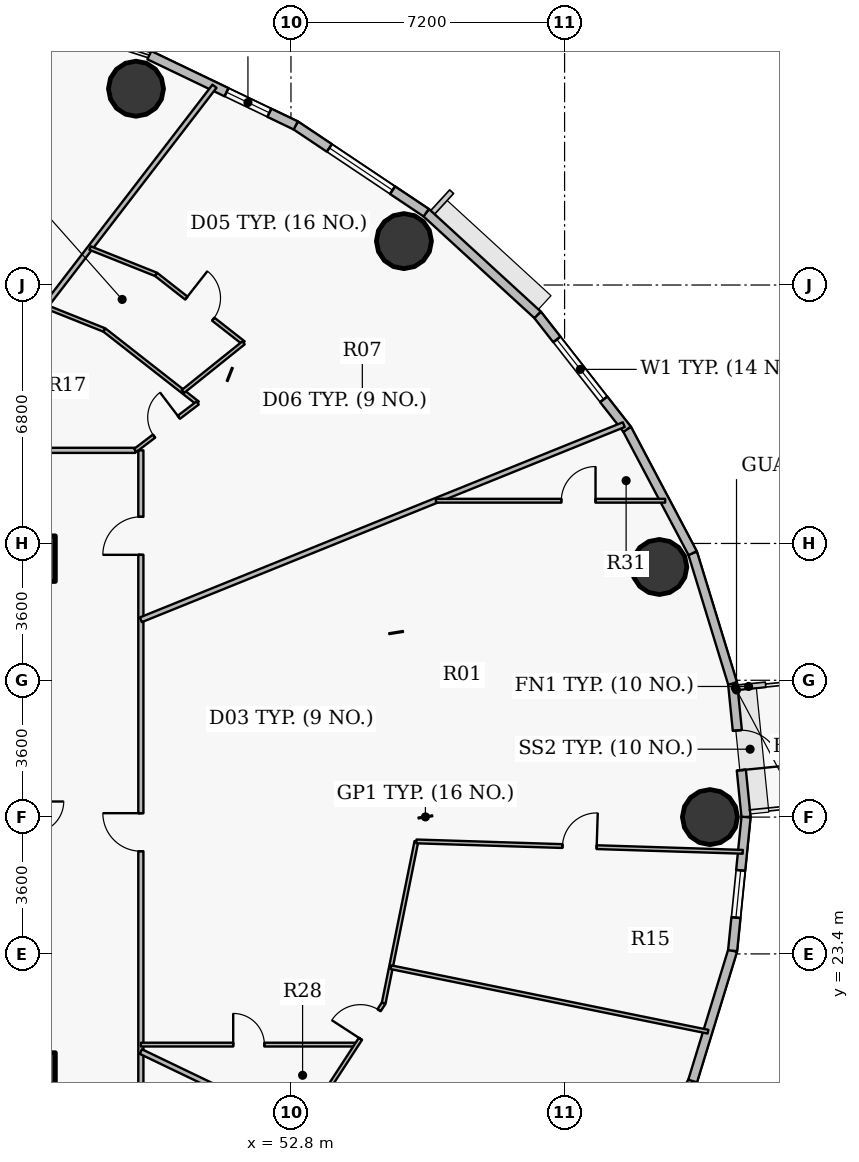
"""IFC4 building model, lengths in metres.
Left out: names, types, materials, properties, quantities, classifications, styles, units other than length and angle.
Written with IfcOpenShell. Run it as: python <this file> out.ifc"""

import sys

from ifc_helpers import new_model, si_unit, direction, frame, frame_2d, origin, origin_2d, place, context, subcontext, project, spatial, rectangle, hollow_circle, extrude, source, transform, mapped, element, fill, save


model = new_model("IFC4")
c1 = context("Model", 3, precision=1e-05, world=origin(), true_north=direction((0.0, 1.0)))
c2 = subcontext(c1, "Body", "Model", "MODEL_VIEW")
j1 = project(units=[si_unit("LENGTHUNIT", "METRE"), si_unit("PLANEANGLEUNIT", "RADIAN")], contexts=[c1])
p1 = place(None, origin())
s1 = spatial("IfcSite", under=j1, at=p1, CompositionType="ELEMENT")
p2 = place(p1, origin())
s2 = spatial("IfcBuilding", under=s1, at=p2, CompositionType="ELEMENT")
p3 = place(p2, frame((0.0, 0.0, 97.2)))
s3 = spatial("IfcBuildingStorey", under=s2, at=p3, CompositionType="ELEMENT", Elevation=97.2)
for number, where, z_axis, x_axis in (
    (1, (46.0, 20.2, 0.0), (0.0, 0.0, 1.0), (1.0, 0.0, 0.0)),
    (2, (46.0, 33.8, 0.0), (0.0, 0.0, 1.0), (1.0, 0.0, 0.0)),
):
    element("IfcColumn", number, at=place(p3, frame(where, z_axis=z_axis, x_axis=x_axis)), inside=s3, PredefinedType="COLUMN", context=c2, shape_type="SweptSolid", body=[
        extrude(rectangle(XDim=1.2, YDim=1.2, at=origin_2d()), origin(), (0.0, 0.0, 1.0), 3.75),
    ])
for number, where, z_axis, x_axis in (
    (3, (63.825, 27.0, 0.0), (0.0, 0.0, 1.0), (1.0, 0.0, 0.0)),
    (4, (62.493, 33.581, 0.0), (0.0, 0.0, 1.0), (1.0, 0.0, 0.0)),
    (5, (55.773, 42.156, 0.0), (0.0, 0.0, 1.0), (1.0, 0.0, 0.0)),
    (6, (48.722, 46.165, 0.0), (0.0, 0.0, 1.0), (1.0, 0.0, 0.0)),
):
    element("IfcColumn", number, at=place(p3, frame(where, z_axis=z_axis, x_axis=x_axis)), inside=s3, PredefinedType="COLUMN", context=c2, shape_type="SweptSolid", body=[
        extrude(hollow_circle(Radius=0.725, WallThickness=0.042, at=origin_2d()), origin(), (0.0, 0.0, 1.0), 3.75),
    ])
p4 = place(p3, frame((64.422, 30.515, 0.0), z_axis=(0.0, 0.0, 1.0), x_axis=(0.099989468229, -0.994988495533, 0.0)))
e7 = element("IfcWall", 7, at=p4, inside=s3, PredefinedType="SOLIDWALL", context=c2, shape_type="SweptSolid", body=[
    extrude(rectangle(XDim=3.533, YDim=0.24, at=frame_2d((1.767, 0.0))), origin(), (0.0, 0.0, 1.0), 3.5),
])
p5 = place(p4, frame((1.241, 0.0, 0.0)))
e8 = element("IfcOpeningElement", 8, at=p5, cuts=e7, PredefinedType="OPENING", context=c2, shape_type="SweptSolid", body=[
    extrude(rectangle(XDim=1.05, YDim=2.15, at=origin_2d()), frame((0.525, 0.13, 1.075), z_axis=(0.0, -1.0, 0.0), x_axis=(1.0, 0.0, 0.0)), (0.0, 0.0, 1.0), 0.26),
])
p6 = place(p3, frame((63.37, 33.945, 0.0), z_axis=(0.0, 0.0, 1.0), x_axis=(0.293124431344, -0.956074300329, 0.0)))
e9 = element("IfcWall", 9, at=p6, inside=s3, PredefinedType="SOLIDWALL", context=c2, shape_type="SweptSolid", body=[
    extrude(rectangle(XDim=3.587, YDim=0.24, at=frame_2d((1.793, 0.0))), origin(), (0.0, 0.0, 1.0), 3.5),
])
p7 = place(p3, frame((61.645, 37.206, 0.0), z_axis=(0.0, 0.0, 1.0), x_axis=(0.467614004126, -0.883932770716, 0.0)))
e10 = element("IfcWall", 10, at=p7, inside=s3, PredefinedType="SOLIDWALL", context=c2, shape_type="SweptSolid", body=[
    extrude(rectangle(XDim=3.689, YDim=0.24, at=frame_2d((1.844, 0.0))), origin(), (0.0, 0.0, 1.0), 3.5),
])
p8 = place(p3, frame((59.289, 40.217, 0.0), z_axis=(0.0, 0.0, 1.0), x_axis=(0.616272103517, -0.787533297345, 0.0)))
e11 = element("IfcWall", 11, at=p8, inside=s3, PredefinedType="SOLIDWALL", context=c2, shape_type="SweptSolid", body=[
    extrude(rectangle(XDim=3.823, YDim=0.24, at=frame_2d((1.912, 0.0))), origin(), (0.0, 0.0, 1.0), 3.5),
])
p9 = place(p8, frame((0.824, 0.0, 0.9)))
e12 = element("IfcOpeningElement", 12, at=p9, cuts=e11, PredefinedType="OPENING", context=c2, shape_type="SweptSolid", body=[
    extrude(rectangle(XDim=2.0, YDim=1.75, at=origin_2d()), frame((1.0, 0.13, 0.875), z_axis=(0.0, -1.0, 0.0), x_axis=(1.0, 0.0, 0.0)), (0.0, 0.0, 1.0), 0.26),
])
p10 = place(p3, frame((56.358, 42.903, 0.0), z_axis=(0.0, 0.0, 1.0), x_axis=(0.737113356241, -0.675769117414, 0.0)))
e13 = element("IfcWall", 13, at=p10, inside=s3, PredefinedType="SOLIDWALL", context=c2, shape_type="SweptSolid", body=[
    extrude(rectangle(XDim=3.976, YDim=0.24, at=frame_2d((1.988, 0.0))), origin(), (0.0, 0.0, 1.0), 3.5),
])
p11 = place(p3, frame((52.925, 45.199, 0.0), z_axis=(0.0, 0.0, 1.0), x_axis=(0.831221811447, -0.555940914284, 0.0)))
e14 = element("IfcWall", 14, at=p11, inside=s3, PredefinedType="SOLIDWALL", context=c2, shape_type="SweptSolid", body=[
    extrude(rectangle(XDim=4.13, YDim=0.24, at=frame_2d((2.065, 0.0))), origin(), (0.0, 0.0, 1.0), 3.5),
])
p12 = place(p11, frame((1.065, 0.0, 0.9)))
e15 = element("IfcOpeningElement", 15, at=p12, cuts=e14, PredefinedType="OPENING", context=c2, shape_type="SweptSolid", body=[
    extrude(rectangle(XDim=2.0, YDim=1.75, at=origin_2d()), frame((1.0, 0.13, 0.875), z_axis=(0.0, -1.0, 0.0), x_axis=(1.0, 0.0, 0.0)), (0.0, 0.0, 1.0), 0.26),
])
p13 = place(p3, frame((49.074, 47.047, 0.0), z_axis=(0.0, 0.0, 1.0), x_axis=(0.901589935876, -0.432591709962, 0.0)))
e16 = element("IfcWall", 16, at=p13, inside=s3, PredefinedType="SOLIDWALL", context=c2, shape_type="SweptSolid", body=[
    extrude(rectangle(XDim=4.272, YDim=0.24, at=frame_2d((2.136, 0.0))), origin(), (0.0, 0.0, 1.0), 3.5),
])
p14 = place(p13, frame((2.252, 0.0, 0.9)))
e17 = element("IfcOpeningElement", 17, at=p14, cuts=e16, PredefinedType="OPENING", context=c2, shape_type="SweptSolid", body=[
    extrude(rectangle(XDim=1.25, YDim=1.65, at=origin_2d()), frame((0.625, 0.13, 0.825), z_axis=(0.0, -1.0, 0.0), x_axis=(1.0, 0.0, 0.0)), (0.0, 0.0, 1.0), 0.26),
])
p15 = place(p3, frame((63.37, 20.055, 0.0), z_axis=(0.0, 0.0, 1.0), x_axis=(-0.467614004126, -0.883932770716, 0.0)))
e18 = element("IfcWall", 18, at=p15, inside=s3, PredefinedType="SOLIDWALL", context=c2, shape_type="SweptSolid", body=[
    extrude(rectangle(XDim=3.689, YDim=0.24, at=frame_2d((1.844, 0.0))), origin(), (0.0, 0.0, 1.0), 3.5),
])
p16 = place(p15, frame((1.219, 0.0, 0.9)))
e19 = element("IfcOpeningElement", 19, at=p16, cuts=e18, PredefinedType="OPENING", context=c2, shape_type="SweptSolid", body=[
    extrude(rectangle(XDim=1.25, YDim=1.65, at=origin_2d()), frame((0.625, 0.13, 0.825), z_axis=(0.0, -1.0, 0.0), x_axis=(1.0, 0.0, 0.0)), (0.0, 0.0, 1.0), 0.26),
])
p17 = place(p3, frame((64.422, 23.485, 0.0), z_axis=(0.0, 0.0, 1.0), x_axis=(-0.293124431344, -0.956074300329, 0.0)))
e20 = element("IfcWall", 20, at=p17, inside=s3, PredefinedType="SOLIDWALL", context=c2, shape_type="SweptSolid", body=[
    extrude(rectangle(XDim=3.587, YDim=0.24, at=frame_2d((1.793, 0.0))), origin(), (0.0, 0.0, 1.0), 3.5),
])
p18 = place(p3, frame((64.775, 27.0, 0.0), z_axis=(0.0, 0.0, 1.0), x_axis=(-0.099989468229, -0.994988495533, 0.0)))
e21 = element("IfcWall", 21, at=p18, inside=s3, PredefinedType="SOLIDWALL", context=c2, shape_type="SweptSolid", body=[
    extrude(rectangle(XDim=3.533, YDim=0.24, at=frame_2d((1.767, 0.0))), origin(), (0.0, 0.0, 1.0), 3.5),
])
p19 = place(p18, frame((1.408, 0.0, 0.9)))
e22 = element("IfcOpeningElement", 22, at=p19, cuts=e21, PredefinedType="OPENING", context=c2, shape_type="SweptSolid", body=[
    extrude(rectangle(XDim=1.25, YDim=1.65, at=origin_2d()), frame((0.625, 0.13, 0.825), z_axis=(0.0, -1.0, 0.0), x_axis=(1.0, 0.0, 0.0)), (0.0, 0.0, 1.0), 0.26),
])
p20 = place(p3, frame((37.205, 36.65, 0.0), z_axis=(0.0, 0.0, 1.0), x_axis=(1.0, 0.0, 0.0)))
e23 = element("IfcWall", 23, at=p20, inside=s3, PredefinedType="PARTITIONING", context=c2, shape_type="SweptSolid", body=[
    extrude(rectangle(XDim=11.499, YDim=0.135, at=frame_2d((5.75, 0.0))), origin(), (0.0, 0.0, 1.0), 2.935),
])
p21 = place(p20, frame((3.988, 0.0, 0.0)))
e24 = element("IfcOpeningElement", 24, at=p21, cuts=e23, PredefinedType="OPENING", context=c2, shape_type="SweptSolid", body=[
    extrude(rectangle(XDim=1.0, YDim=2.15, at=origin_2d()), frame((0.5, 0.078, 1.075), z_axis=(0.0, -1.0, 0.0), x_axis=(1.0, 0.0, 0.0)), (0.0, 0.0, 1.0), 0.155),
])
p22 = place(p3, frame((43.42, 36.65, 0.0), z_axis=(0.0, 0.0, 1.0), x_axis=(0.609572126114, 0.792730611913, 0.0)))
e25 = element("IfcWall", 25, at=p22, inside=s3, PredefinedType="PARTITIONING", context=c2, shape_type="SweptSolid", body=[
    extrude(rectangle(XDim=12.086, YDim=0.135, at=frame_2d((6.043, 0.0))), origin(), (0.0, 0.0, 1.0), 2.935),
])
p23 = place(p3, frame((46.333, 40.437, 0.0), z_axis=(0.0, 0.0, 1.0), x_axis=(0.928817558248, -0.370537371247, 0.0)))
e26 = element("IfcWall", 26, at=p23, inside=s3, PredefinedType="PARTITIONING", context=c2, shape_type="SweptSolid", body=[
    extrude(rectangle(XDim=1.677, YDim=0.1, at=frame_2d((0.839, 0.0))), origin(), (0.0, 0.0, 1.0), 3.185),
])
p24 = place(p3, frame((47.514, 41.973, 0.0), z_axis=(0.0, 0.0, 1.0), x_axis=(0.928809612726, -0.370557287485, 0.0)))
e27 = element("IfcWall", 27, at=p24, inside=s3, PredefinedType="PARTITIONING", context=c2, shape_type="SweptSolid", body=[
    extrude(rectangle(XDim=1.869, YDim=0.1, at=frame_2d((0.935, 0.0))), origin(), (0.0, 0.0, 1.0), 3.5),
])
p25 = place(p3, frame((47.891, 39.816, 0.0), z_axis=(0.0, 0.0, 1.0), x_axis=(0.787339621997, -0.616519520887, 0.0)))
e28 = element("IfcWall", 28, at=p25, inside=s3, PredefinedType="PARTITIONING", context=c2, shape_type="SweptSolid", body=[
    extrude(rectangle(XDim=3.116, YDim=0.1, at=frame_2d((1.558, 0.0))), origin(), (0.0, 0.0, 1.0), 2.935),
])
p26 = place(p3, frame((48.704, 36.65, 0.0), z_axis=(0.0, 0.0, 1.0), x_axis=(0.796299280247, 0.604902848628, 0.0)))
e29 = element("IfcWall", 29, at=p26, inside=s3, PredefinedType="PARTITIONING", context=c2, shape_type="SweptSolid", body=[
    extrude(rectangle(XDim=2.059, YDim=0.1, at=frame_2d((1.029, 0.0))), origin(), (0.0, 0.0, 1.0), 2.935),
])
p27 = place(p26, frame((0.619, 0.0, 0.0)))
e30 = element("IfcOpeningElement", 30, at=p27, cuts=e29, PredefinedType="OPENING", context=c2, shape_type="SweptSolid", body=[
    extrude(rectangle(XDim=0.82, YDim=2.1, at=origin_2d()), frame((0.41, 0.06, 1.05), z_axis=(0.0, -1.0, 0.0), x_axis=(1.0, 0.0, 0.0)), (0.0, 0.0, 1.0), 0.12),
])
p28 = place(p3, frame((48.85, 17.35, 0.0), z_axis=(0.0, 0.0, 1.0), x_axis=(0.0, 1.0, 0.0)))
e31 = element("IfcWall", 31, at=p28, inside=s3, PredefinedType="PARTITIONING", context=c2, shape_type="SweptSolid", body=[
    extrude(rectangle(XDim=19.3, YDim=0.135, at=frame_2d((9.65, 0.0))), origin(), (0.0, 0.0, 1.0), 2.935),
])
p29 = place(p28, frame((16.551, 0.0, 0.0)))
e32 = element("IfcOpeningElement", 32, at=p29, cuts=e31, PredefinedType="OPENING", context=c2, shape_type="SweptSolid", body=[
    extrude(rectangle(XDim=1.0, YDim=2.15, at=origin_2d()), frame((0.5, 0.078, 1.075), z_axis=(0.0, -1.0, 0.0), x_axis=(1.0, 0.0, 0.0)), (0.0, 0.0, 1.0), 0.155),
])
p30 = place(p28, frame((8.753, 0.0, 0.0)))
e33 = element("IfcOpeningElement", 33, at=p30, cuts=e31, PredefinedType="OPENING", context=c2, shape_type="SweptSolid", body=[
    extrude(rectangle(XDim=1.0, YDim=2.15, at=origin_2d()), frame((0.5, 0.078, 1.075), z_axis=(0.0, -1.0, 0.0), x_axis=(1.0, 0.0, 0.0)), (0.0, 0.0, 1.0), 0.155),
])
p31 = place(p3, frame((48.85, 20.83, 0.0), z_axis=(0.0, 0.0, 1.0), x_axis=(0.901472427533, -0.432836530803, 0.0)))
e34 = element("IfcWall", 34, at=p31, inside=s3, PredefinedType="PARTITIONING", context=c2, shape_type="SweptSolid", body=[
    extrude(rectangle(XDim=12.869, YDim=0.135, at=frame_2d((6.434, 0.0))), origin(), (0.0, 0.0, 1.0), 2.935),
])
p32 = place(p3, frame((48.85, 21.014, 0.0), z_axis=(0.0, 0.0, 1.0), x_axis=(1.0, 0.0, 0.0)))
e35 = element("IfcWall", 35, at=p32, inside=s3, PredefinedType="PARTITIONING", context=c2, shape_type="SweptSolid", body=[
    extrude(rectangle(XDim=5.68, YDim=0.1, at=frame_2d((2.84, 0.0))), origin(), (0.0, 0.0, 1.0), 2.935),
])
p33 = place(p32, frame((2.43, 0.0, 0.0)))
e36 = element("IfcOpeningElement", 36, at=p33, cuts=e35, PredefinedType="OPENING", context=c2, shape_type="SweptSolid", body=[
    extrude(rectangle(XDim=0.82, YDim=2.1, at=origin_2d()), frame((0.41, 0.06, 1.05), z_axis=(0.0, -1.0, 0.0), x_axis=(1.0, 0.0, 0.0)), (0.0, 0.0, 1.0), 0.12),
])
p34 = place(p3, frame((48.85, 32.192, 0.0), z_axis=(0.0, 0.0, 1.0), x_axis=(0.927181163505, 0.374613253958, 0.0)))
e37 = element("IfcWall", 37, at=p34, inside=s3, PredefinedType="PARTITIONING", context=c2, shape_type="SweptSolid", body=[
    extrude(rectangle(XDim=13.706, YDim=0.135, at=frame_2d((6.853, 0.0))), origin(), (0.0, 0.0, 1.0), 2.935),
])
p35 = place(p3, frame((49.25, 41.28, 0.0), z_axis=(0.0, 0.0, 1.0), x_axis=(0.787360471536, -0.616492893602, 0.0)))
e38 = element("IfcWall", 38, at=p35, inside=s3, PredefinedType="PARTITIONING", context=c2, shape_type="SweptSolid", body=[
    extrude(rectangle(XDim=2.923, YDim=0.1, at=frame_2d((1.462, 0.0))), origin(), (0.0, 0.0, 1.0), 3.5),
])
p36 = place(p35, frame((1.012, 0.0, 0.0)))
e39 = element("IfcOpeningElement", 39, at=p36, cuts=e38, PredefinedType="OPENING", context=c2, shape_type="SweptSolid", body=[
    extrude(rectangle(XDim=0.9, YDim=2.1, at=origin_2d()), frame((0.45, 0.06, 1.05), z_axis=(0.0, -1.0, 0.0), x_axis=(1.0, 0.0, 0.0)), (0.0, 0.0, 1.0), 0.12),
])
p37 = place(p3, frame((49.956, 38.198, 0.0), z_axis=(0.0, 0.0, 1.0), x_axis=(0.78000622602, 0.625771753413, 0.0)))
e40 = element("IfcWall", 40, at=p37, inside=s3, PredefinedType="PARTITIONING", context=c2, shape_type="SweptSolid", body=[
    extrude(rectangle(XDim=2.045, YDim=0.1, at=frame_2d((1.022, 0.0))), origin(), (0.0, 0.0, 1.0), 3.185),
])
p38 = place(p3, frame((53.087, 18.796, 0.0), z_axis=(0.0, 0.0, 1.0), x_axis=(0.545403476424, 0.838173638278, 0.0)))
e41 = element("IfcWall", 41, at=p38, inside=s3, PredefinedType="PARTITIONING", context=c2, shape_type="SweptSolid", body=[
    extrude(rectangle(XDim=3.948, YDim=0.1, at=frame_2d((1.974, 0.0))), origin(), (0.0, 0.0, 1.0), 2.935),
])
p39 = place(p38, frame((2.827, 0.0, 0.0)))
e42 = element("IfcOpeningElement", 42, at=p39, cuts=e41, PredefinedType="OPENING", context=c2, shape_type="SweptSolid", body=[
    extrude(rectangle(XDim=0.9, YDim=2.1, at=origin_2d()), frame((0.45, 0.06, 1.05), z_axis=(0.0, -1.0, 0.0), x_axis=(1.0, 0.0, 0.0)), (0.0, 0.0, 1.0), 0.12),
])
p40 = place(p3, frame((55.24, 22.105, 0.0), z_axis=(0.0, 0.0, 1.0), x_axis=(0.198113230311, 0.980179140757, 0.0)))
e43 = element("IfcWall", 43, at=p40, inside=s3, PredefinedType="PARTITIONING", context=c2, shape_type="SweptSolid", body=[
    extrude(rectangle(XDim=0.964, YDim=0.1, at=frame_2d((0.482, 0.0))), origin(), (0.0, 0.0, 1.0), 3.5),
])
p41 = place(p3, frame((55.433, 23.059, 0.0), z_axis=(0.0, 0.0, 1.0), x_axis=(0.198276597798, 0.980146106846, 0.0)))
e44 = element("IfcWall", 44, at=p41, inside=s3, PredefinedType="PARTITIONING", context=c2, shape_type="SweptSolid", body=[
    extrude(rectangle(XDim=3.368, YDim=0.1, at=frame_2d((1.684, 0.0))), origin(), (0.0, 0.0, 1.0), 3.5),
])
p42 = place(p3, frame((55.431, 23.05, 0.0), z_axis=(0.0, 0.0, 1.0), x_axis=(0.979953651871, -0.199225601228, 0.0)))
e45 = element("IfcWall", 45, at=p42, inside=s3, PredefinedType="PARTITIONING", context=c2, shape_type="SweptSolid", body=[
    extrude(rectangle(XDim=8.513, YDim=0.1, at=frame_2d((4.257, 0.0))), origin(), (0.0, 0.0, 1.0), 2.935),
])
p43 = place(p3, frame((56.101, 26.36, 0.0), z_axis=(0.0, 0.0, 1.0), x_axis=(0.999493466978, -0.031824667605, 0.0)))
e46 = element("IfcWall", 46, at=p43, inside=s3, PredefinedType="PARTITIONING", context=c2, shape_type="SweptSolid", body=[
    extrude(rectangle(XDim=8.592, YDim=0.1, at=frame_2d((4.296, 0.0))), origin(), (0.0, 0.0, 1.0), 2.935),
])
p44 = place(p43, frame((3.846, 0.0, 0.0)))
e47 = element("IfcOpeningElement", 47, at=p44, cuts=e46, PredefinedType="OPENING", context=c2, shape_type="SweptSolid", body=[
    extrude(rectangle(XDim=0.9, YDim=2.1, at=origin_2d()), frame((0.45, 0.06, 1.05), z_axis=(0.0, -1.0, 0.0), x_axis=(1.0, 0.0, 0.0)), (0.0, 0.0, 1.0), 0.12),
])
p45 = place(p3, frame((56.615, 35.324, 0.0), z_axis=(0.0, 0.0, 1.0), x_axis=(1.0, 0.0, 0.0)))
e48 = element("IfcWall", 48, at=p45, inside=s3, PredefinedType="PARTITIONING", context=c2, shape_type="SweptSolid", body=[
    extrude(rectangle(XDim=6.031, YDim=0.1, at=frame_2d((3.016, 0.0))), origin(), (0.0, 0.0, 1.0), 2.935),
])
p46 = place(p45, frame((3.3, 0.0, 0.0)))
e49 = element("IfcOpeningElement", 49, at=p46, cuts=e48, PredefinedType="OPENING", context=c2, shape_type="SweptSolid", body=[
    extrude(rectangle(XDim=0.9, YDim=2.1, at=origin_2d()), frame((0.45, 0.06, 1.05), z_axis=(0.0, -1.0, 0.0), x_axis=(1.0, 0.0, 0.0)), (0.0, 0.0, 1.0), 0.12),
])
m1 = source(origin(), c2, "Body", "SweptSolid", [
    extrude(rectangle(XDim=1.05, YDim=2.15, at=origin_2d()), frame((0.525, 0.025, 1.075), z_axis=(0.0, -1.0, 0.0), x_axis=(1.0, 0.0, 0.0)), (0.0, 0.0, 1.0), 0.05),
])
p47 = place(p5, origin())
e50 = element("IfcDoor", 50, at=p47, inside=s3, OperationType="SINGLE_SWING_RIGHT", PredefinedType="DOOR", context=c2, shape_type="MappedRepresentation", body=[
    mapped(m1, transform((0.0, 0.0, 0.0), x_axis=(1.0, 0.0, 0.0), y_axis=(0.0, 1.0, 0.0), z_axis=(0.0, 0.0, 1.0), scale=1.0)),
])
fill(e8, e50)
m2 = source(origin(), c2, "Body", "SweptSolid", [
    extrude(rectangle(XDim=2.0, YDim=1.75, at=origin_2d()), frame((1.0, 0.03, 0.875), z_axis=(0.0, -1.0, 0.0), x_axis=(1.0, 0.0, 0.0)), (0.0, 0.0, 1.0), 0.06),
])
p48 = place(p9, origin())
e51 = element("IfcWindow", 51, at=p48, inside=s3, PartitioningType="DOUBLE_PANEL_VERTICAL", PredefinedType="WINDOW", context=c2, shape_type="MappedRepresentation", body=[
    mapped(m2, transform((0.0, 0.0, 0.0), x_axis=(1.0, 0.0, 0.0), y_axis=(0.0, 1.0, 0.0), z_axis=(0.0, 0.0, 1.0), scale=1.0)),
])
fill(e12, e51)
p49 = place(p12, origin())
e52 = element("IfcWindow", 52, at=p49, inside=s3, PartitioningType="DOUBLE_PANEL_VERTICAL", PredefinedType="WINDOW", context=c2, shape_type="MappedRepresentation", body=[
    mapped(m2, transform((0.0, 0.0, 0.0), x_axis=(1.0, 0.0, 0.0), y_axis=(0.0, 1.0, 0.0), z_axis=(0.0, 0.0, 1.0), scale=1.0)),
])
fill(e15, e52)
m3 = source(origin(), c2, "Body", "SweptSolid", [
    extrude(rectangle(XDim=1.25, YDim=1.65, at=origin_2d()), frame((0.625, 0.03, 0.825), z_axis=(0.0, -1.0, 0.0), x_axis=(1.0, 0.0, 0.0)), (0.0, 0.0, 1.0), 0.06),
])
p50 = place(p14, origin())
e53 = element("IfcWindow", 53, at=p50, inside=s3, PartitioningType="SINGLE_PANEL", PredefinedType="WINDOW", context=c2, shape_type="MappedRepresentation", body=[
    mapped(m3, transform((0.0, 0.0, 0.0), x_axis=(1.0, 0.0, 0.0), y_axis=(0.0, 1.0, 0.0), z_axis=(0.0, 0.0, 1.0), scale=1.0)),
])
fill(e17, e53)
p51 = place(p19, origin())
e54 = element("IfcWindow", 54, at=p51, inside=s3, PartitioningType="SINGLE_PANEL", PredefinedType="WINDOW", context=c2, shape_type="MappedRepresentation", body=[
    mapped(m3, transform((0.0, 0.0, 0.0), x_axis=(1.0, 0.0, 0.0), y_axis=(0.0, 1.0, 0.0), z_axis=(0.0, 0.0, 1.0), scale=1.0)),
])
fill(e22, e54)
m4 = source(origin(), c2, "Body", "SweptSolid", [
    extrude(rectangle(XDim=1.0, YDim=2.15, at=origin_2d()), frame((0.5, 0.025, 1.075), z_axis=(0.0, -1.0, 0.0), x_axis=(1.0, 0.0, 0.0)), (0.0, 0.0, 1.0), 0.05),
])
p52 = place(p29, origin())
e55 = element("IfcDoor", 55, at=p52, inside=s3, OperationType="SINGLE_SWING_LEFT", PredefinedType="DOOR", context=c2, shape_type="MappedRepresentation", body=[
    mapped(m4, transform((0.0, 0.0, 0.0), x_axis=(1.0, 0.0, 0.0), y_axis=(0.0, 1.0, 0.0), z_axis=(0.0, 0.0, 1.0), scale=1.0)),
])
fill(e32, e55)
m5 = source(origin(), c2, "Body", "SweptSolid", [
    extrude(rectangle(XDim=0.82, YDim=2.1, at=origin_2d()), frame((0.41, 0.025, 1.05), z_axis=(0.0, -1.0, 0.0), x_axis=(1.0, 0.0, 0.0)), (0.0, 0.0, 1.0), 0.05),
])
p53 = place(p27, origin())
e56 = element("IfcDoor", 56, at=p53, inside=s3, OperationType="SINGLE_SWING_RIGHT", PredefinedType="DOOR", context=c2, shape_type="MappedRepresentation", body=[
    mapped(m5, transform((0.0, 0.0, 0.0), x_axis=(1.0, 0.0, 0.0), y_axis=(0.0, 1.0, 0.0), z_axis=(0.0, 0.0, 1.0), scale=1.0)),
])
fill(e30, e56)
m6 = source(origin(), c2, "Body", "SweptSolid", [
    extrude(rectangle(XDim=0.9, YDim=2.1, at=origin_2d()), frame((0.45, 0.025, 1.05), z_axis=(0.0, -1.0, 0.0), x_axis=(1.0, 0.0, 0.0)), (0.0, 0.0, 1.0), 0.05),
])
p54 = place(p36, origin())
e57 = element("IfcDoor", 57, at=p54, inside=s3, OperationType="SINGLE_SWING_LEFT", PredefinedType="DOOR", context=c2, shape_type="MappedRepresentation", body=[
    mapped(m6, transform((0.0, 0.0, 0.0), x_axis=(1.0, 0.0, 0.0), y_axis=(0.0, 1.0, 0.0), z_axis=(0.0, 0.0, 1.0), scale=1.0)),
])
fill(e39, e57)
p55 = place(p30, origin())
e58 = element("IfcDoor", 58, at=p55, inside=s3, OperationType="SINGLE_SWING_RIGHT", PredefinedType="DOOR", context=c2, shape_type="MappedRepresentation", body=[
    mapped(m4, transform((0.0, 0.0, 0.0), x_axis=(1.0, 0.0, 0.0), y_axis=(0.0, 1.0, 0.0), z_axis=(0.0, 0.0, 1.0), scale=1.0)),
])
fill(e33, e58)
p56 = place(p39, origin())
e59 = element("IfcDoor", 59, at=p56, inside=s3, OperationType="SINGLE_SWING_LEFT", PredefinedType="DOOR", context=c2, shape_type="MappedRepresentation", body=[
    mapped(m6, transform((0.0, 0.0, 0.0), x_axis=(1.0, 0.0, 0.0), y_axis=(0.0, 1.0, 0.0), z_axis=(0.0, 0.0, 1.0), scale=1.0)),
])
fill(e42, e59)
p57 = place(p44, origin())
e60 = element("IfcDoor", 60, at=p57, inside=s3, OperationType="SINGLE_SWING_RIGHT", PredefinedType="DOOR", context=c2, shape_type="MappedRepresentation", body=[
    mapped(m6, transform((0.0, 0.0, 0.0), x_axis=(1.0, 0.0, 0.0), y_axis=(0.0, 1.0, 0.0), z_axis=(0.0, 0.0, 1.0), scale=1.0)),
])
fill(e47, e60)
p58 = place(p33, origin())
e61 = element("IfcDoor", 61, at=p58, inside=s3, OperationType="SINGLE_SWING_LEFT", PredefinedType="DOOR", context=c2, shape_type="MappedRepresentation", body=[
    mapped(m5, transform((0.0, 0.0, 0.0), x_axis=(1.0, 0.0, 0.0), y_axis=(0.0, 1.0, 0.0), z_axis=(0.0, 0.0, 1.0), scale=1.0)),
])
fill(e36, e61)
p59 = place(p46, origin())
e62 = element("IfcDoor", 62, at=p59, inside=s3, OperationType="SINGLE_SWING_RIGHT", PredefinedType="DOOR", context=c2, shape_type="MappedRepresentation", body=[
    mapped(m6, transform((0.0, 0.0, 0.0), x_axis=(1.0, 0.0, 0.0), y_axis=(0.0, 1.0, 0.0), z_axis=(0.0, 0.0, 1.0), scale=1.0)),
])
fill(e49, e62)
save(model, sys.argv[1])
